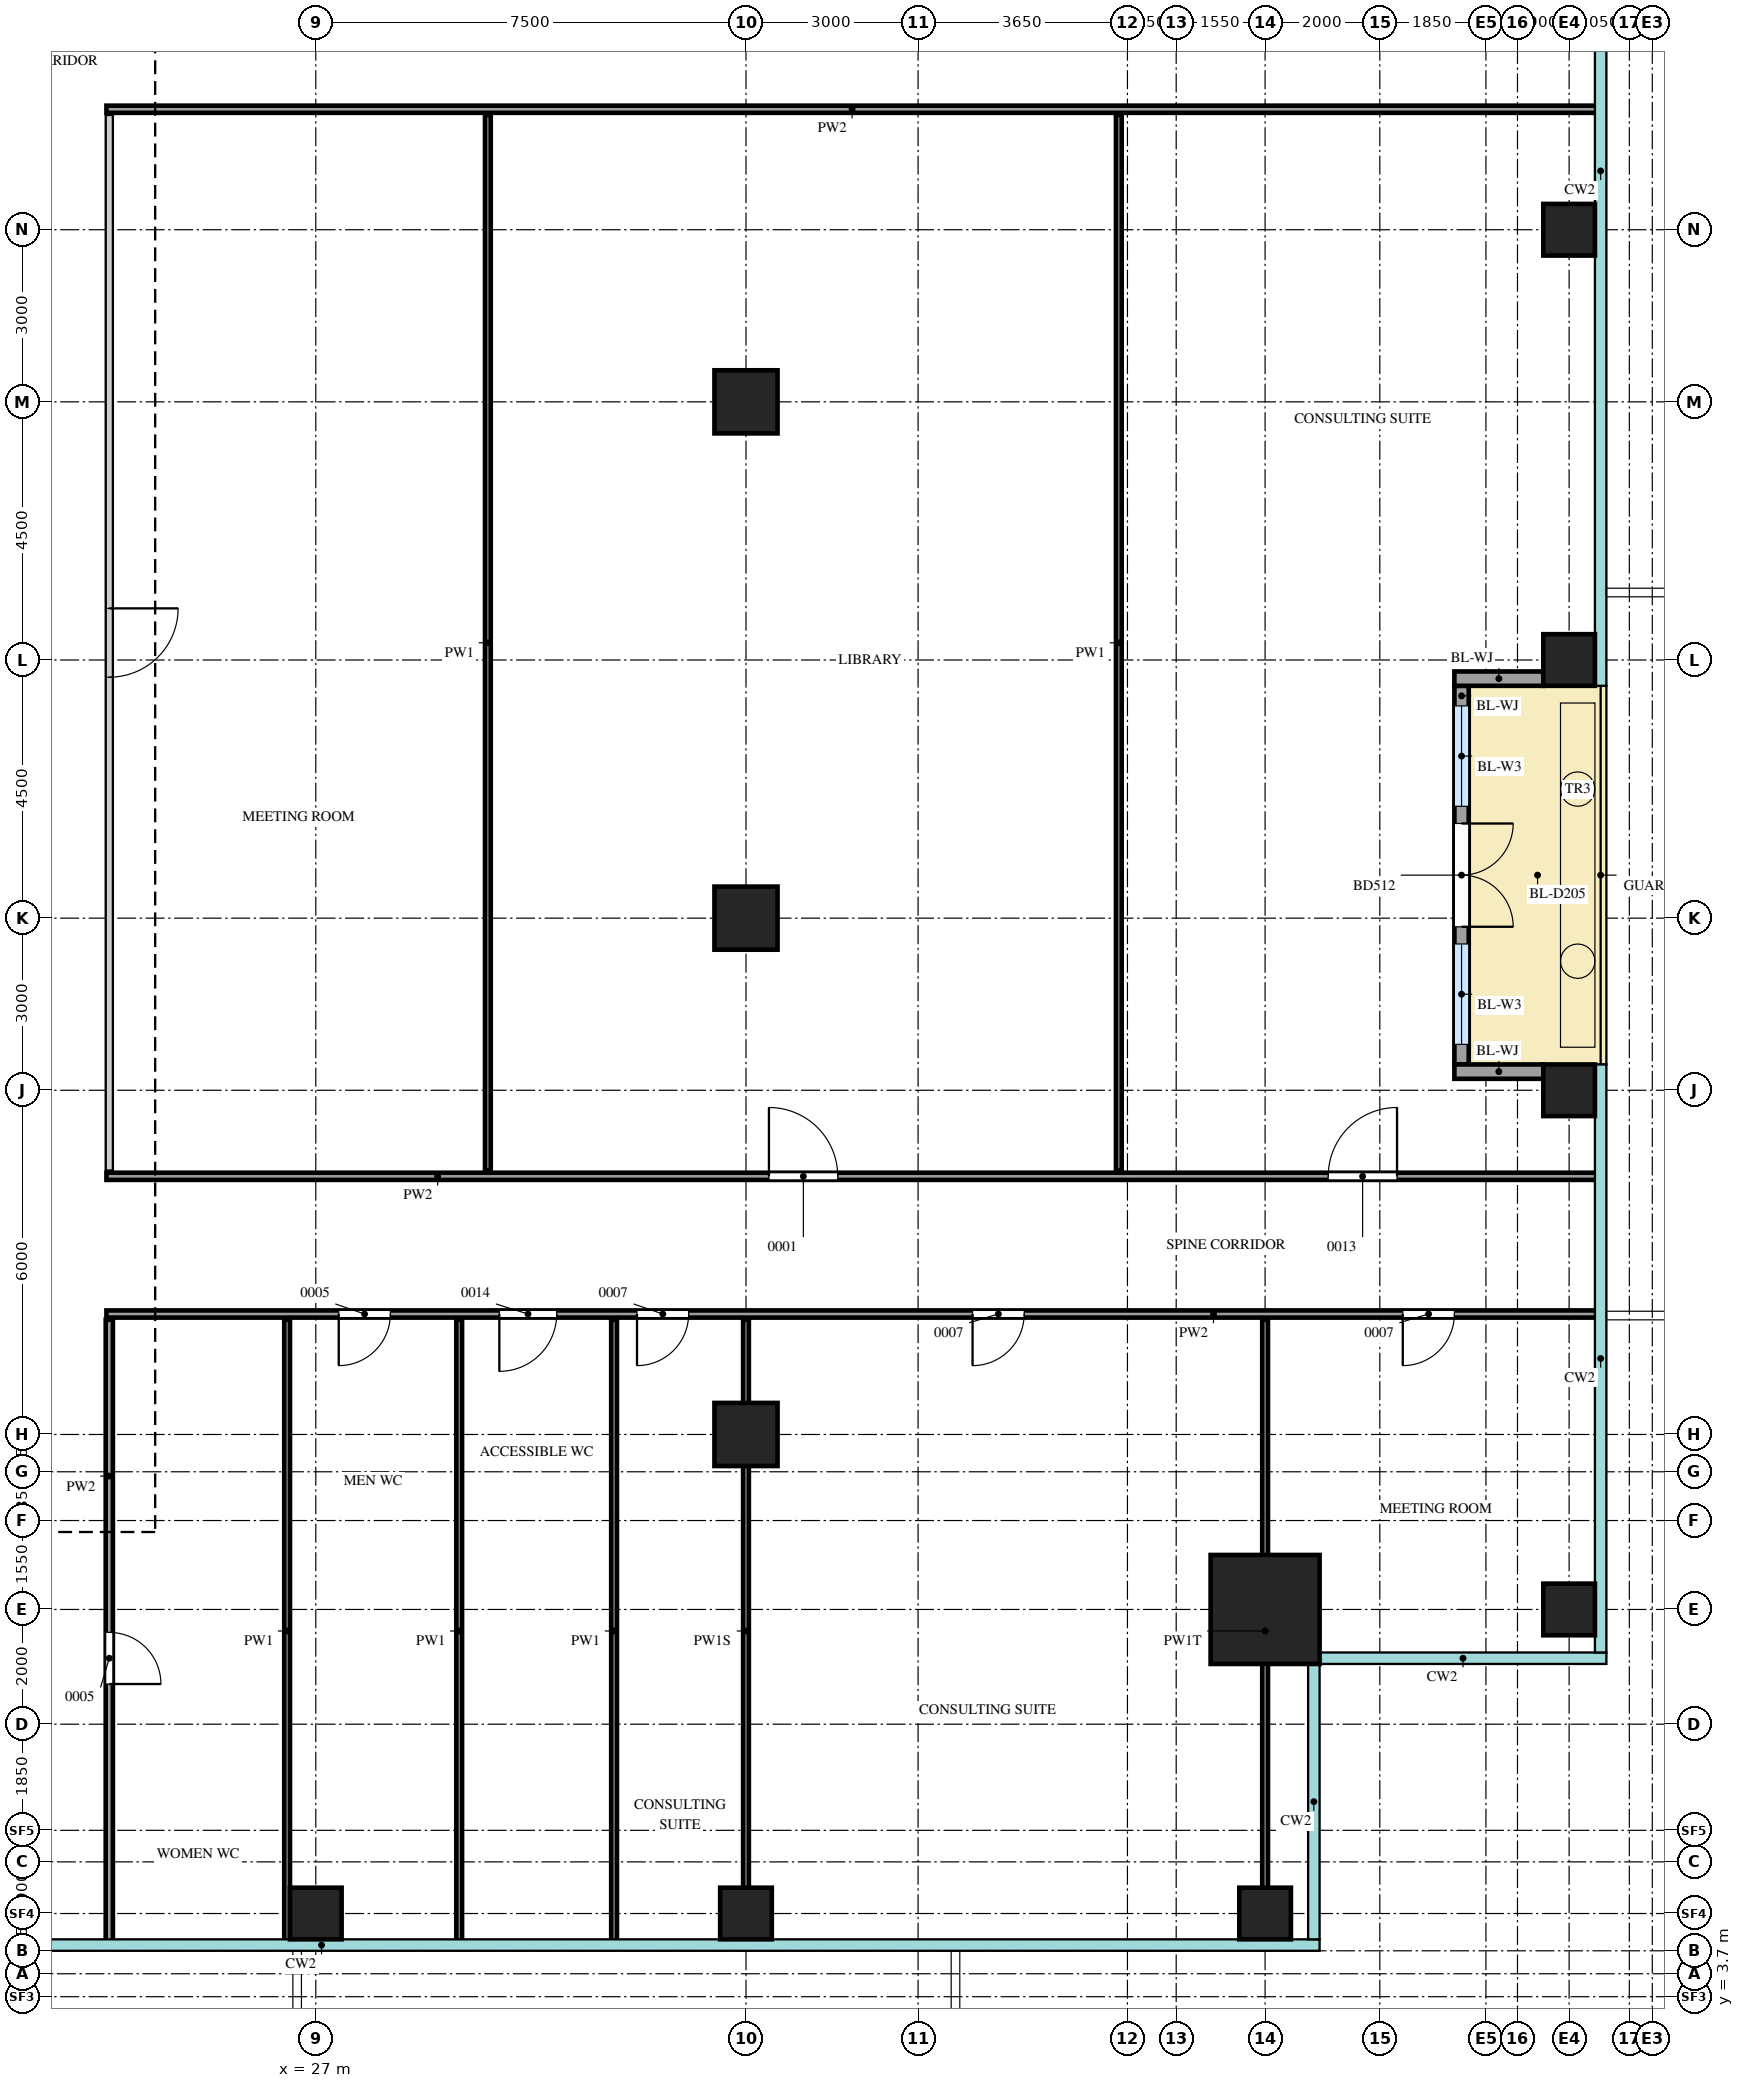
"""IFC4 building model, lengths in metres.
Left out: names, types, materials, properties, quantities, classifications, styles, units other than length and angle.
Written with IfcOpenShell. Run it as: python <this file> out.ifc"""

import sys

from ifc_helpers import new_model, si_unit, direction, frame, frame_2d, origin, origin_2d, place, context, subcontext, project, spatial, rectangle, extrude, source, transform, mapped, element, fill, save


model = new_model("IFC4")
c1 = context("Model", 3, precision=1e-05, world=origin(), true_north=direction((0.0, 1.0)))
c2 = subcontext(c1, "Body", "Model", "MODEL_VIEW")
j1 = project(units=[si_unit("LENGTHUNIT", "METRE"), si_unit("PLANEANGLEUNIT", "RADIAN")], contexts=[c1])
p1 = place(None, origin())
s1 = spatial("IfcSite", under=j1, at=p1, CompositionType="ELEMENT")
p2 = place(p1, origin())
s2 = spatial("IfcBuilding", under=s1, at=p2, CompositionType="ELEMENT")
p3 = place(p2, frame((0.0, 0.0, 230.2)))
s3 = spatial("IfcBuildingStorey", under=s2, at=p3, CompositionType="ELEMENT", Elevation=230.2)
m1 = source(origin(), c2, "Body", "SweptSolid", [
    extrude(rectangle(XDim=1.9, YDim=1.9, at=origin_2d()), origin(), (0.0, 0.0, 1.0), 4.0),
])
p4 = place(p3, frame((43.55, 10.45, 0.0), z_axis=(0.0, 0.0, 1.0), x_axis=(1.0, 0.0, 0.0)))
e1 = element("IfcColumn", 1, at=p4, inside=s3, PredefinedType="COLUMN", context=c2, shape_type="MappedRepresentation", body=[
    mapped(m1, transform((0.0, 0.0, 0.0))),
])
m2 = source(origin(), c2, "Body", "SweptSolid", [
    extrude(rectangle(XDim=0.9, YDim=0.9, at=origin_2d()), origin(), (0.0, 0.0, 1.0), 3.75),
])
for number, where, z_axis, x_axis in (
    (2, (27.0, 5.15, 0.0), (0.0, 0.0, 1.0), (1.0, 0.0, 0.0)),
    (3, (34.5, 5.15, 0.0), (0.0, 0.0, 1.0), (1.0, 0.0, 0.0)),
    (4, (43.55, 5.15, 0.0), (0.0, 0.0, 1.0), (1.0, 0.0, 0.0)),
    (5, (48.85, 10.45, 0.0), (0.0, 0.0, 1.0), (1.0, 0.0, 0.0)),
    (6, (48.85, 19.5, 0.0), (0.0, 0.0, 1.0), (1.0, 0.0, 0.0)),
    (7, (48.85, 27.0, 0.0), (0.0, 0.0, 1.0), (1.0, 0.0, 0.0)),
    (8, (48.85, 34.5, 0.0), (0.0, 0.0, 1.0), (1.0, 0.0, 0.0)),
):
    element("IfcColumn", number, at=place(p3, frame(where, z_axis=z_axis, x_axis=x_axis)), inside=s3, PredefinedType="COLUMN", context=c2, shape_type="MappedRepresentation", body=[
        mapped(m2, transform((0.0, 0.0, 0.0))),
    ])
m3 = source(origin(), c2, "Body", "SweptSolid", [
    extrude(rectangle(XDim=1.1, YDim=1.1, at=origin_2d()), origin(), (0.0, 0.0, 1.0), 3.75),
])
for number, where, z_axis, x_axis in (
    (9, (34.5, 13.5, 0.0), (0.0, 0.0, 1.0), (1.0, 0.0, 0.0)),
    (10, (34.5, 22.5, 0.0), (0.0, 0.0, 1.0), (1.0, 0.0, 0.0)),
    (11, (34.5, 31.5, 0.0), (0.0, 0.0, 1.0), (1.0, 0.0, 0.0)),
):
    element("IfcColumn", number, at=place(p3, frame(where, z_axis=z_axis, x_axis=x_axis)), inside=s3, PredefinedType="COLUMN", context=c2, shape_type="MappedRepresentation", body=[
        mapped(m3, transform((0.0, 0.0, 0.0))),
    ])
m4 = source(origin(), c2, "Body", "SweptSolid", [
    extrude(rectangle(XDim=6.6, YDim=0.25, at=frame_2d((3.3, 0.0))), origin(), (0.0, 0.0, 1.0), 3.2),
])
p5 = place(p3, frame((46.975, 19.95, 0.0), z_axis=(0.0, 0.0, 1.0), x_axis=(0.0, 1.0, 0.0)))
e12 = element("IfcWall", 12, at=p5, inside=s3, PredefinedType="SOLIDWALL", context=c2, shape_type="MappedRepresentation", body=[
    mapped(m4, transform((0.0, 0.0, 0.0))),
])
m5 = source(origin(), c2, "Body", "SweptSolid", [
    extrude(rectangle(XDim=1.75, YDim=2.4, at=frame_2d((0.875, 1.2))), frame((0.0, 0.135, 0.0), z_axis=(0.0, -1.0, 0.0), x_axis=(1.0, 0.0, 0.0)), (0.0, 0.0, 1.0), 0.27),
])
p6 = place(p5, frame((0.35, 0.0, 0.0)))
e13 = element("IfcOpeningElement", 13, at=p6, cuts=e12, PredefinedType="OPENING", context=c2, shape_type="MappedRepresentation", body=[
    mapped(m5, transform((0.0, 0.0, 0.0))),
])
p7 = place(p5, frame((4.5, 0.0, 0.0)))
e14 = element("IfcOpeningElement", 14, at=p7, cuts=e12, PredefinedType="OPENING", context=c2, shape_type="MappedRepresentation", body=[
    mapped(m5, transform((0.0, 0.0, 0.0))),
])
m6 = source(origin(), c2, "Body", "SweptSolid", [
    extrude(rectangle(XDim=1.8, YDim=2.4, at=frame_2d((0.9, 1.2))), frame((0.0, 0.135, 0.0), z_axis=(0.0, -1.0, 0.0), x_axis=(1.0, 0.0, 0.0)), (0.0, 0.0, 1.0), 0.27),
])
p8 = place(p5, frame((2.4, 0.0, 0.0)))
e15 = element("IfcOpeningElement", 15, at=p8, cuts=e12, PredefinedType="OPENING", context=c2, shape_type="MappedRepresentation", body=[
    mapped(m6, transform((0.0, 0.0, 0.0))),
])
m7 = source(origin(), c2, "Body", "SweptSolid", [
    extrude(rectangle(XDim=1.55, YDim=0.25, at=frame_2d((0.775, 0.0))), origin(), (0.0, 0.0, 1.0), 3.2),
])
for number, where, z_axis, x_axis in (
    (16, (48.4, 19.825, 0.0), (0.0, 0.0, 1.0), (-1.0, 0.0, 0.0)),
    (17, (48.4, 26.675, 0.0), (0.0, 0.0, 1.0), (-1.0, 0.0, 0.0)),
):
    element("IfcWall", number, at=place(p3, frame(where, z_axis=z_axis, x_axis=x_axis)), inside=s3, PredefinedType="SOLIDWALL", context=c2, shape_type="MappedRepresentation", body=[
        mapped(m7, transform((0.0, 0.0, 0.0))),
    ])
m8 = source(origin(), c2, "Body", "SweptSolid", [
    extrude(rectangle(XDim=10.85, YDim=0.125, at=frame_2d((5.425, 0.0))), origin(), (0.0, 0.0, 1.0), 3.8),
])
p9 = place(p3, frame((23.4, 4.65, 0.0), z_axis=(0.0, 0.0, 1.0), x_axis=(0.0, 1.0, 0.0)))
e18 = element("IfcWall", 18, at=p9, inside=s3, PredefinedType="PARTITIONING", context=c2, shape_type="MappedRepresentation", body=[
    mapped(m8, transform((0.0, 0.0, 0.0))),
])
m9 = source(origin(), c2, "Body", "SweptSolid", [
    extrude(rectangle(XDim=0.9, YDim=2.1, at=frame_2d((0.45, 1.05))), frame((0.0, 0.073, 0.0), z_axis=(0.0, -1.0, 0.0), x_axis=(1.0, 0.0, 0.0)), (0.0, 0.0, 1.0), 0.145),
])
p10 = place(p9, frame((4.5, 0.0, 0.0)))
e19 = element("IfcOpeningElement", 19, at=p10, cuts=e18, PredefinedType="OPENING", context=c2, shape_type="MappedRepresentation", body=[
    mapped(m9, transform((0.0, 0.0, 0.0))),
])
m10 = source(origin(), c2, "Body", "SweptSolid", [
    extrude(rectangle(XDim=10.85, YDim=0.1, at=frame_2d((5.425, 0.0))), origin(), (0.0, 0.0, 1.0), 3.8),
])
for number, where, z_axis, x_axis in (
    (20, (26.5, 4.65, 0.0), (0.0, 0.0, 1.0), (0.0, 1.0, 0.0)),
    (21, (29.5, 4.65, 0.0), (0.0, 0.0, 1.0), (0.0, 1.0, 0.0)),
    (22, (32.2, 4.65, 0.0), (0.0, 0.0, 1.0), (0.0, 1.0, 0.0)),
):
    element("IfcWall", number, at=place(p3, frame(where, z_axis=z_axis, x_axis=x_axis)), inside=s3, PredefinedType="PARTITIONING", context=c2, shape_type="MappedRepresentation", body=[
        mapped(m10, transform((0.0, 0.0, 0.0))),
    ])
m11 = source(origin(), c2, "Body", "SweptSolid", [
    extrude(rectangle(XDim=10.85, YDim=0.1, at=frame_2d((5.425, 0.0))), origin(), (0.0, 0.0, 1.0), 3.35),
])
p11 = place(p3, frame((34.5, 4.65, 0.0), z_axis=(0.0, 0.0, 1.0), x_axis=(0.0, 1.0, 0.0)))
e23 = element("IfcWall", 23, at=p11, inside=s3, PredefinedType="PARTITIONING", context=c2, shape_type="MappedRepresentation", body=[
    mapped(m11, transform((0.0, 0.0, 0.0))),
])
m12 = source(origin(), c2, "Body", "SweptSolid", [
    extrude(rectangle(XDim=10.85, YDim=0.1, at=frame_2d((5.425, 0.0))), origin(), (0.0, 0.0, 1.0), 3.3),
])
p12 = place(p3, frame((43.55, 4.65, 0.0), z_axis=(0.0, 0.0, 1.0), x_axis=(0.0, 1.0, 0.0)))
e24 = element("IfcWall", 24, at=p12, inside=s3, PredefinedType="PARTITIONING", context=c2, shape_type="MappedRepresentation", body=[
    mapped(m12, transform((0.0, 0.0, 0.0))),
])
m13 = source(origin(), c2, "Body", "SweptSolid", [
    extrude(rectangle(XDim=26.0, YDim=0.125, at=frame_2d((13.0, 0.0))), origin(), (0.0, 0.0, 1.0), 3.8),
])
p13 = place(p3, frame((23.35, 15.6, 0.0), z_axis=(0.0, 0.0, 1.0), x_axis=(1.0, 0.0, 0.0)))
e25 = element("IfcWall", 25, at=p13, inside=s3, PredefinedType="PARTITIONING", context=c2, shape_type="MappedRepresentation", body=[
    mapped(m13, transform((0.0, 0.0, 0.0))),
])
p14 = place(p13, frame((4.05, 0.0, 0.0)))
e26 = element("IfcOpeningElement", 26, at=p14, cuts=e25, PredefinedType="OPENING", context=c2, shape_type="MappedRepresentation", body=[
    mapped(m9, transform((0.0, 0.0, 0.0))),
])
m14 = source(origin(), c2, "Body", "SweptSolid", [
    extrude(rectangle(XDim=1.0, YDim=2.1, at=frame_2d((0.5, 1.05))), frame((0.0, 0.073, 0.0), z_axis=(0.0, -1.0, 0.0), x_axis=(1.0, 0.0, 0.0)), (0.0, 0.0, 1.0), 0.145),
])
p15 = place(p13, frame((6.85, 0.0, 0.0)))
e27 = element("IfcOpeningElement", 27, at=p15, cuts=e25, PredefinedType="OPENING", context=c2, shape_type="MappedRepresentation", body=[
    mapped(m14, transform((0.0, 0.0, 0.0))),
])
p16 = place(p13, frame((9.25, 0.0, 0.0)))
e28 = element("IfcOpeningElement", 28, at=p16, cuts=e25, PredefinedType="OPENING", context=c2, shape_type="MappedRepresentation", body=[
    mapped(m9, transform((0.0, 0.0, 0.0))),
])
p17 = place(p13, frame((15.1, 0.0, 0.0)))
e29 = element("IfcOpeningElement", 29, at=p17, cuts=e25, PredefinedType="OPENING", context=c2, shape_type="MappedRepresentation", body=[
    mapped(m9, transform((0.0, 0.0, 0.0))),
])
p18 = place(p13, frame((22.6, 0.0, 0.0)))
e30 = element("IfcOpeningElement", 30, at=p18, cuts=e25, PredefinedType="OPENING", context=c2, shape_type="MappedRepresentation", body=[
    mapped(m9, transform((0.0, 0.0, 0.0))),
])
p19 = place(p3, frame((23.35, 18.0, 0.0), z_axis=(0.0, 0.0, 1.0), x_axis=(1.0, 0.0, 0.0)))
e31 = element("IfcWall", 31, at=p19, inside=s3, PredefinedType="PARTITIONING", context=c2, shape_type="MappedRepresentation", body=[
    mapped(m13, transform((0.0, 0.0, 0.0))),
])
m15 = source(origin(), c2, "Body", "SweptSolid", [
    extrude(rectangle(XDim=1.2, YDim=2.1, at=frame_2d((0.6, 1.05))), frame((0.0, 0.073, 0.0), z_axis=(0.0, -1.0, 0.0), x_axis=(1.0, 0.0, 0.0)), (0.0, 0.0, 1.0), 0.145),
])
p20 = place(p19, frame((11.55, 0.0, 0.0)))
e32 = element("IfcOpeningElement", 32, at=p20, cuts=e31, PredefinedType="OPENING", context=c2, shape_type="MappedRepresentation", body=[
    mapped(m15, transform((0.0, 0.0, 0.0))),
])
p21 = place(p19, frame((21.3, 0.0, 0.0)))
e33 = element("IfcOpeningElement", 33, at=p21, cuts=e31, PredefinedType="OPENING", context=c2, shape_type="MappedRepresentation", body=[
    mapped(m15, transform((0.0, 0.0, 0.0))),
])
m16 = source(origin(), c2, "Body", "SweptSolid", [
    extrude(rectangle(XDim=18.4, YDim=0.125, at=frame_2d((9.2, 0.0))), origin(), (0.0, 0.0, 1.0), 3.8),
])
p22 = place(p3, frame((23.4, 18.1, 0.0), z_axis=(0.0, 0.0, 1.0), x_axis=(0.0, 1.0, 0.0)))
e34 = element("IfcWall", 34, at=p22, inside=s3, PredefinedType="PARTITIONING", context=c2, shape_type="MappedRepresentation", body=[
    mapped(m16, transform((0.0, 0.0, 0.0))),
])
p23 = place(p22, frame((8.6, 0.0, 0.0)))
e35 = element("IfcOpeningElement", 35, at=p23, cuts=e34, PredefinedType="OPENING", context=c2, shape_type="MappedRepresentation", body=[
    mapped(m15, transform((0.0, 0.0, 0.0))),
])
m17 = source(origin(), c2, "Body", "SweptSolid", [
    extrude(rectangle(XDim=18.4, YDim=0.1, at=frame_2d((9.2, 0.0))), origin(), (0.0, 0.0, 1.0), 3.8),
])
for number, where, z_axis, x_axis in (
    (36, (30.0, 18.1, 0.0), (0.0, 0.0, 1.0), (0.0, 1.0, 0.0)),
    (37, (41.0, 18.1, 0.0), (0.0, 0.0, 1.0), (0.0, 1.0, 0.0)),
):
    element("IfcWall", number, at=place(p3, frame(where, z_axis=z_axis, x_axis=x_axis)), inside=s3, PredefinedType="PARTITIONING", context=c2, shape_type="MappedRepresentation", body=[
        mapped(m17, transform((0.0, 0.0, 0.0))),
    ])
p24 = place(p3, frame((23.35, 36.6, 0.0), z_axis=(0.0, 0.0, 1.0), x_axis=(1.0, 0.0, 0.0)))
e38 = element("IfcWall", 38, at=p24, inside=s3, PredefinedType="PARTITIONING", context=c2, shape_type="MappedRepresentation", body=[
    mapped(m13, transform((0.0, 0.0, 0.0))),
])
m18 = source(origin(), c2, "Body", "SweptSolid", [
    extrude(rectangle(XDim=1.75, YDim=2.4, at=frame_2d((0.875, 1.2))), frame((0.0, 0.03, 0.0), z_axis=(0.0, -1.0, 0.0), x_axis=(1.0, 0.0, 0.0)), (0.0, 0.0, 1.0), 0.06),
])
p25 = place(p6, origin())
e39 = element("IfcWindow", 39, at=p25, inside=s3, PartitioningType="SINGLE_PANEL", PredefinedType="WINDOW", context=c2, shape_type="MappedRepresentation", body=[
    mapped(m18, transform((0.0, 0.0, 0.0))),
])
fill(e13, e39)
p26 = place(p7, origin())
e40 = element("IfcWindow", 40, at=p26, inside=s3, PartitioningType="SINGLE_PANEL", PredefinedType="WINDOW", context=c2, shape_type="MappedRepresentation", body=[
    mapped(m18, transform((0.0, 0.0, 0.0))),
])
fill(e14, e40)
m19 = source(origin(), c2, "Body", "SweptSolid", [
    extrude(rectangle(XDim=1.8, YDim=2.4, at=frame_2d((0.9, 1.2))), frame((0.0, 0.025, 0.0), z_axis=(0.0, -1.0, 0.0), x_axis=(1.0, 0.0, 0.0)), (0.0, 0.0, 1.0), 0.05),
])
p27 = place(p8, origin())
e41 = element("IfcDoor", 41, at=p27, inside=s3, OperationType="DOUBLE_DOOR_DOUBLE_SWING", PredefinedType="DOOR", context=c2, shape_type="MappedRepresentation", body=[
    mapped(m19, transform((0.0, 0.0, 0.0))),
])
fill(e15, e41)
m20 = source(origin(), c2, "Body", "SweptSolid", [
    extrude(rectangle(XDim=0.9, YDim=2.1, at=frame_2d((0.45, 1.05))), frame((0.0, 0.025, 0.0), z_axis=(0.0, -1.0, 0.0), x_axis=(1.0, 0.0, 0.0)), (0.0, 0.0, 1.0), 0.05),
])
p28 = place(p10, origin())
e42 = element("IfcDoor", 42, at=p28, inside=s3, OperationType="SINGLE_SWING_LEFT", PredefinedType="DOOR", context=c2, shape_type="MappedRepresentation", body=[
    mapped(m20, transform((0.0, 0.0, 0.0))),
])
fill(e19, e42)
p29 = place(p14, origin())
e43 = element("IfcDoor", 43, at=p29, inside=s3, OperationType="SINGLE_SWING_LEFT", PredefinedType="DOOR", context=c2, shape_type="MappedRepresentation", body=[
    mapped(m20, transform((0.0, 0.0, 0.0))),
])
fill(e26, e43)
m21 = source(origin(), c2, "Body", "SweptSolid", [
    extrude(rectangle(XDim=1.0, YDim=2.1, at=frame_2d((0.5, 1.05))), frame((0.0, 0.025, 0.0), z_axis=(0.0, -1.0, 0.0), x_axis=(1.0, 0.0, 0.0)), (0.0, 0.0, 1.0), 0.05),
])
p30 = place(p15, origin())
e44 = element("IfcDoor", 44, at=p30, inside=s3, OperationType="SINGLE_SWING_LEFT", PredefinedType="DOOR", context=c2, shape_type="MappedRepresentation", body=[
    mapped(m21, transform((0.0, 0.0, 0.0))),
])
fill(e27, e44)
p31 = place(p16, origin())
e45 = element("IfcDoor", 45, at=p31, inside=s3, OperationType="SINGLE_SWING_LEFT", PredefinedType="DOOR", context=c2, shape_type="MappedRepresentation", body=[
    mapped(m20, transform((0.0, 0.0, 0.0))),
])
fill(e28, e45)
p32 = place(p17, origin())
e46 = element("IfcDoor", 46, at=p32, inside=s3, OperationType="SINGLE_SWING_LEFT", PredefinedType="DOOR", context=c2, shape_type="MappedRepresentation", body=[
    mapped(m20, transform((0.0, 0.0, 0.0))),
])
fill(e29, e46)
p33 = place(p18, origin())
e47 = element("IfcDoor", 47, at=p33, inside=s3, OperationType="SINGLE_SWING_LEFT", PredefinedType="DOOR", context=c2, shape_type="MappedRepresentation", body=[
    mapped(m20, transform((0.0, 0.0, 0.0))),
])
fill(e30, e47)
m22 = source(origin(), c2, "Body", "SweptSolid", [
    extrude(rectangle(XDim=1.2, YDim=2.1, at=frame_2d((0.6, 1.05))), frame((0.0, 0.025, 0.0), z_axis=(0.0, -1.0, 0.0), x_axis=(1.0, 0.0, 0.0)), (0.0, 0.0, 1.0), 0.05),
])
p34 = place(p23, origin())
e48 = element("IfcDoor", 48, at=p34, inside=s3, OperationType="SINGLE_SWING_RIGHT", PredefinedType="DOOR", context=c2, shape_type="MappedRepresentation", body=[
    mapped(m22, transform((0.0, 0.0, 0.0))),
])
fill(e35, e48)
p35 = place(p20, origin())
e49 = element("IfcDoor", 49, at=p35, inside=s3, OperationType="SINGLE_SWING_RIGHT", PredefinedType="DOOR", context=c2, shape_type="MappedRepresentation", body=[
    mapped(m22, transform((0.0, 0.0, 0.0))),
])
fill(e32, e49)
p36 = place(p21, origin())
e50 = element("IfcDoor", 50, at=p36, inside=s3, OperationType="SINGLE_SWING_LEFT", PredefinedType="DOOR", context=c2, shape_type="MappedRepresentation", body=[
    mapped(m22, transform((0.0, 0.0, 0.0))),
])
fill(e33, e50)
save(model, sys.argv[1])
